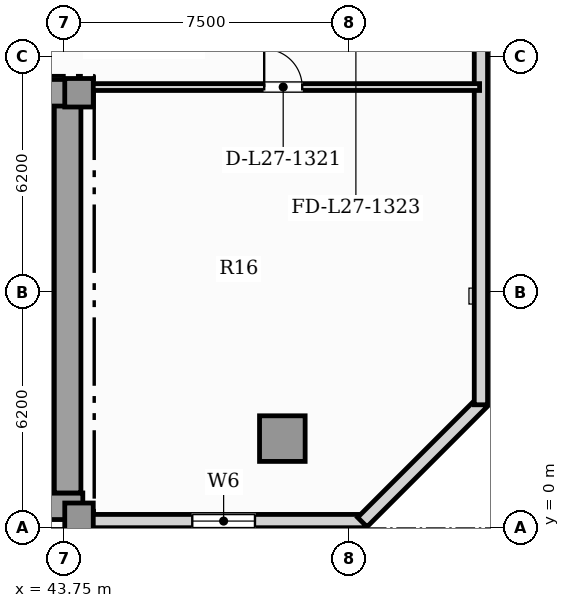
"""IFC4 building model, lengths in metres.
Left out: names, types, materials, properties, quantities, classifications, styles, units other than length and angle.
Written with IfcOpenShell. Run it as: python <this file> out.ifc"""

import sys

from ifc_helpers import new_model, si_unit, direction, frame, frame_2d, origin, origin_2d, place, context, subcontext, project, spatial, rectangle, hollow_rectangle, extrude, element, fill, save


model = new_model("IFC4")
c1 = context("Model", 3, precision=1e-05, world=origin(), true_north=direction((0.0, 1.0)))
c2 = subcontext(c1, "Body", "Model", "MODEL_VIEW")
j1 = project(units=[si_unit("LENGTHUNIT", "METRE"), si_unit("PLANEANGLEUNIT", "RADIAN")], contexts=[c1])
p1 = place(None, origin())
s1 = spatial("IfcSite", under=j1, at=p1, CompositionType="ELEMENT")
p2 = place(p1, origin())
s2 = spatial("IfcBuilding", under=s1, at=p2, CompositionType="ELEMENT")
p3 = place(p2, frame((0.0, 0.0, 111.85)))
s3 = spatial("IfcBuildingStorey", under=s2, at=p3, CompositionType="ELEMENT", Elevation=111.85)
p4 = place(p3, frame((13.25, 0.57, 0.0), z_axis=(0.0, 0.0, 1.0), x_axis=(1.0, 0.0, 0.0)))
e1 = element("IfcWall", 1, at=p4, inside=s3, PredefinedType="SHEAR", context=c2, shape_type="SweptSolid", body=[
    extrude(rectangle(XDim=31.0, YDim=0.7, at=frame_2d((15.5, 0.0))), origin(), (0.0, 0.0, 1.0), 3.6),
])
p5 = place(p3, frame((43.85, 0.92, 0.0), z_axis=(0.0, 0.0, 1.0), x_axis=(0.0, 1.0, 0.0)))
e2 = element("IfcWall", 2, at=p5, inside=s3, PredefinedType="SHEAR", context=c2, shape_type="SweptSolid", body=[
    extrude(rectangle(XDim=10.53, YDim=0.7, at=frame_2d((5.265, 0.0))), origin(), (0.0, 0.0, 1.0), 3.6),
])
p6 = place(p3, frame((41.3, 11.45, 0.0), z_axis=(0.0, 0.0, 1.0), x_axis=(1.0, 0.0, 0.0)))
e3 = element("IfcWall", 3, at=p6, inside=s3, PredefinedType="SHEAR", context=c2, shape_type="SweptSolid", body=[
    extrude(rectangle(XDim=2.95, YDim=0.7, at=frame_2d((1.475, 0.0))), origin(), (0.0, 0.0, 1.0), 3.6),
])
for number, where, z_axis, x_axis in (
    (4, (44.15, 0.28, 0.0), (0.0, 0.0, 1.0), (1.0, 0.0, 0.0)),
    (5, (44.15, 11.45, 0.0), (0.0, 0.0, 1.0), (1.0, 0.0, 0.0)),
):
    element("IfcColumn", number, at=place(p3, frame(where, z_axis=z_axis, x_axis=x_axis)), inside=s3, PredefinedType="COLUMN", context=c2, shape_type="SweptSolid", body=[
        extrude(rectangle(XDim=0.75, YDim=0.75, at=origin_2d()), origin(), (0.0, 0.0, 1.0), 3.85),
    ])
p7 = place(p3, frame((49.5, 2.35, 0.0), z_axis=(0.0, 0.0, 1.0), x_axis=(1.0, 0.0, 0.0)))
e6 = element("IfcColumn", 6, at=p7, inside=s3, PredefinedType="USERDEFINED", context=c2, shape_type="SweptSolid", body=[
    extrude(hollow_rectangle(XDim=1.2, YDim=1.2, WallThickness=0.07, at=origin_2d()), origin(), (0.0, 0.0, 1.0), 3.85),
])
p8 = place(p3, frame((44.25, 0.18, 0.0), z_axis=(0.0, 0.0, 1.0), x_axis=(1.0, 0.0, 0.0)))
e7 = element("IfcWall", 7, at=p8, inside=s3, PredefinedType="SOLIDWALL", context=c2, shape_type="SweptSolid", body=[
    extrude(rectangle(XDim=7.41, YDim=0.35, at=frame_2d((3.705, 0.0))), origin(), (0.0, 0.0, 1.0), 3.6),
])
p9 = place(p8, frame((2.88, 0.0, 0.88)))
e8 = element("IfcOpeningElement", 8, at=p9, cuts=e7, PredefinedType="OPENING", context=c2, shape_type="SweptSolid", body=[
    extrude(rectangle(XDim=1.65, YDim=2.0, at=frame_2d((0.825, 1.0))), frame((0.0, 0.185, 0.0), z_axis=(0.0, -1.0, 0.0), x_axis=(1.0, 0.0, 0.0)), (0.0, 0.0, 1.0), 0.37),
])
p10 = place(p3, frame((51.604, 0.152, 0.0), z_axis=(0.0, 0.0, 1.0), x_axis=(0.707134240044, 0.707079321262, 0.0)))
e9 = element("IfcWall", 9, at=p10, inside=s3, PredefinedType="SOLIDWALL", context=c2, shape_type="SweptSolid", body=[
    extrude(rectangle(XDim=4.446, YDim=0.35, at=frame_2d((2.223, 0.0))), origin(), (0.0, 0.0, 1.0), 3.6),
])
p11 = place(p3, frame((54.725, 3.24, 0.0), z_axis=(0.0, 0.0, 1.0), x_axis=(0.0, 1.0, 0.0)))
e10 = element("IfcWall", 10, at=p11, inside=s3, PredefinedType="SOLIDWALL", context=c2, shape_type="SweptSolid", body=[
    extrude(rectangle(XDim=19.07, YDim=0.35, at=frame_2d((9.535, 0.0))), origin(), (0.0, 0.0, 1.0), 3.6),
])
p12 = place(p11, frame((12.755, 0.0, 0.88)))
e11 = element("IfcOpeningElement", 11, at=p12, cuts=e10, PredefinedType="OPENING", context=c2, shape_type="SweptSolid", body=[
    extrude(rectangle(XDim=1.65, YDim=2.0, at=frame_2d((0.825, 1.0))), frame((0.0, 0.185, 0.0), z_axis=(0.0, -1.0, 0.0), x_axis=(1.0, 0.0, 0.0)), (0.0, 0.0, 1.0), 0.37),
])
p13 = place(p3, frame((40.06, 8.52, 0.0), z_axis=(0.0, 0.0, 1.0), x_axis=(1.0, 0.0, 0.0)))
e12 = element("IfcWall", 12, at=p13, inside=s3, PredefinedType="SOLIDWALL", context=c2, shape_type="SweptSolid", body=[
    extrude(rectangle(XDim=3.4, YDim=0.22, at=frame_2d((1.7, 0.0))), origin(), (0.0, 0.0, 1.0), 3.6),
])
p14 = place(p13, frame((1.125, 0.0, 0.0)))
e13 = element("IfcOpeningElement", 13, at=p14, cuts=e12, PredefinedType="OPENING", context=c2, shape_type="SweptSolid", body=[
    extrude(rectangle(XDim=1.15, YDim=2.2, at=frame_2d((0.575, 1.1))), frame((0.0, 0.12, 0.0), z_axis=(0.0, -1.0, 0.0), x_axis=(1.0, 0.0, 0.0)), (0.0, 0.0, 1.0), 0.24),
])
p15 = place(p3, frame((44.355, 11.6, 0.0), z_axis=(0.0, 0.0, 1.0), x_axis=(1.0, 0.0, 0.0)))
e14 = element("IfcWall", 14, at=p15, inside=s3, PredefinedType="PARTITIONING", context=c2, shape_type="SweptSolid", body=[
    extrude(rectangle(XDim=10.335, YDim=0.18, at=frame_2d((5.167, 0.0))), origin(), (0.0, 0.0, 1.0), 3.6),
])
p16 = place(p15, frame((4.667, 0.0, 0.0)))
e15 = element("IfcOpeningElement", 15, at=p16, cuts=e14, PredefinedType="OPENING", context=c2, shape_type="SweptSolid", body=[
    extrude(rectangle(XDim=1.0, YDim=2.15, at=frame_2d((0.5, 1.075))), frame((0.0, 0.1, 0.0), z_axis=(0.0, -1.0, 0.0), x_axis=(1.0, 0.0, 0.0)), (0.0, 0.0, 1.0), 0.2),
])
p17 = place(p9, origin())
e16 = element("IfcWindow", 16, at=p17, inside=s3, PartitioningType="SINGLE_PANEL", PredefinedType="WINDOW", context=c2, shape_type="SweptSolid", body=[
    extrude(rectangle(XDim=1.65, YDim=2.0, at=frame_2d((0.825, 1.0))), frame((0.0, 0.03, 0.0), z_axis=(0.0, -1.0, 0.0), x_axis=(1.0, 0.0, 0.0)), (0.0, 0.0, 1.0), 0.06),
])
fill(e8, e16)
p18 = place(p16, origin())
e17 = element("IfcDoor", 17, at=p18, inside=s3, OperationType="SINGLE_SWING_LEFT", PredefinedType="DOOR", context=c2, shape_type="SweptSolid", body=[
    extrude(rectangle(XDim=1.0, YDim=2.15, at=frame_2d((0.5, 1.075))), frame((0.0, 0.025, 0.0), z_axis=(0.0, -1.0, 0.0), x_axis=(1.0, 0.0, 0.0)), (0.0, 0.0, 1.0), 0.05),
])
fill(e15, e17)
save(model, sys.argv[1])
